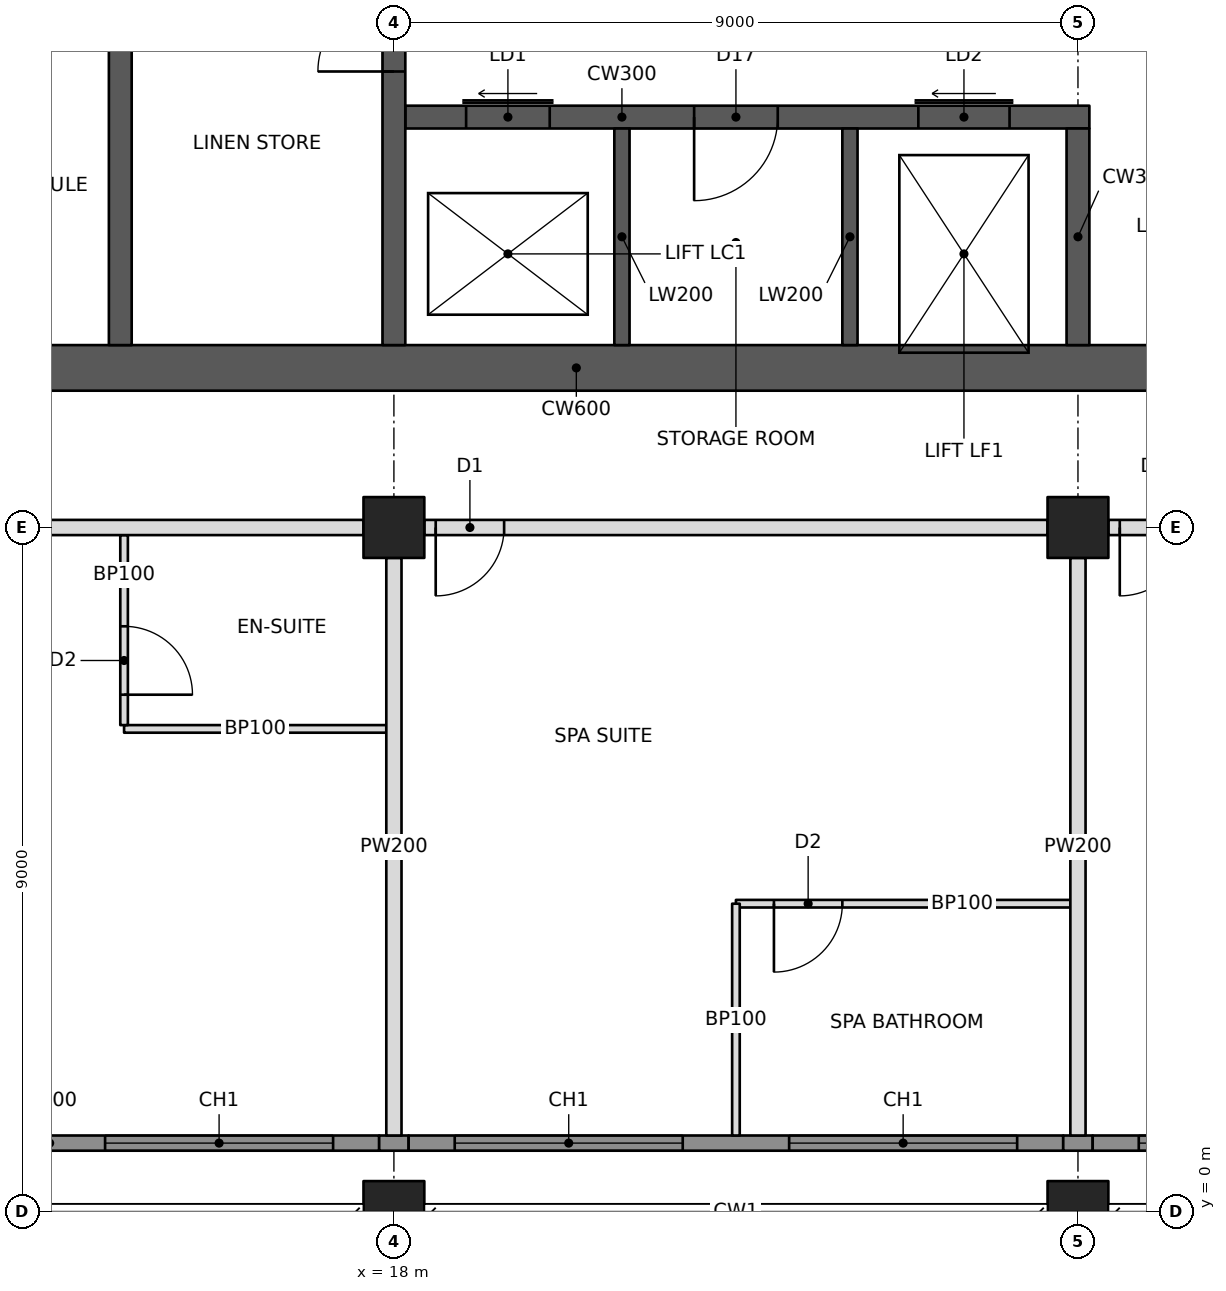
"""IFC4 building model, lengths in metres.
Left out: names, types, materials, properties, quantities, classifications, styles, units other than length and angle.
Written with IfcOpenShell. Run it as: python <this file> out.ifc"""

import sys

from ifc_helpers import new_model, si_unit, direction, frame, frame_2d, origin, origin_2d, place, context, subcontext, project, spatial, rectangle, hollow_rectangle, extrude, element, fill, save


model = new_model("IFC4")
c1 = context("Model", 3, precision=1e-05, world=origin(), true_north=direction((0.0, 1.0)))
c2 = subcontext(c1, "Body", "Model", "MODEL_VIEW")
j1 = project(units=[si_unit("LENGTHUNIT", "METRE"), si_unit("PLANEANGLEUNIT", "RADIAN")], contexts=[c1])
p1 = place(None, origin())
s1 = spatial("IfcSite", under=j1, at=p1, CompositionType="ELEMENT")
p2 = place(p1, origin())
s2 = spatial("IfcBuilding", under=s1, at=p2, CompositionType="ELEMENT")
p3 = place(p2, frame((0.0, 0.0, 174.0)))
s3 = spatial("IfcBuildingStorey", under=s2, at=p3, CompositionType="ELEMENT", Elevation=174.0)
p4 = place(p3, frame((18.0, 0.0, 0.0), z_axis=(0.0, 0.0, 1.0), x_axis=(1.0, 0.0, 0.0)))
e1 = element("IfcColumn", 1, at=p4, inside=s3, PredefinedType="COLUMN", context=c2, shape_type="SweptSolid", body=[
    extrude(hollow_rectangle(XDim=0.8, YDim=0.8, WallThickness=0.07, at=origin_2d()), origin(), (0.0, 0.0, 1.0), 3.4),
])
p5 = place(p3, frame((18.0, 9.0, 0.0), z_axis=(0.0, 0.0, 1.0), x_axis=(1.0, 0.0, 0.0)))
e2 = element("IfcColumn", 2, at=p5, inside=s3, PredefinedType="COLUMN", context=c2, shape_type="SweptSolid", body=[
    extrude(hollow_rectangle(XDim=0.8, YDim=0.8, WallThickness=0.06, at=origin_2d()), origin(), (0.0, 0.0, 1.0), 3.4),
])
p6 = place(p3, frame((27.0, 0.0, 0.0), z_axis=(0.0, 0.0, 1.0), x_axis=(1.0, 0.0, 0.0)))
e3 = element("IfcColumn", 3, at=p6, inside=s3, PredefinedType="COLUMN", context=c2, shape_type="SweptSolid", body=[
    extrude(hollow_rectangle(XDim=0.8, YDim=0.8, WallThickness=0.07, at=origin_2d()), origin(), (0.0, 0.0, 1.0), 3.4),
])
p7 = place(p3, frame((27.0, 9.0, 0.0), z_axis=(0.0, 0.0, 1.0), x_axis=(1.0, 0.0, 0.0)))
e4 = element("IfcColumn", 4, at=p7, inside=s3, PredefinedType="COLUMN", context=c2, shape_type="SweptSolid", body=[
    extrude(hollow_rectangle(XDim=0.8, YDim=0.8, WallThickness=0.06, at=origin_2d()), origin(), (0.0, 0.0, 1.0), 3.4),
])
p8 = place(p3, frame((10.8, 11.1, 0.0), z_axis=(0.0, 0.0, 1.0), x_axis=(1.0, 0.0, 0.0)))
e5 = element("IfcWall", 5, at=p8, inside=s3, PredefinedType="SHEAR", context=c2, shape_type="SweptSolid", body=[
    extrude(rectangle(XDim=23.4, YDim=0.6, at=frame_2d((11.7, 0.0))), origin(), (0.0, 0.0, 1.0), 3.4),
])
p9 = place(p8, frame((1.0, 0.0, 0.0)))
e6 = element("IfcOpeningElement", 6, at=p9, cuts=e5, PredefinedType="OPENING", context=c2, shape_type="SweptSolid", body=[
    extrude(rectangle(XDim=1.0, YDim=2.1, at=frame_2d((0.5, 1.05))), frame((0.0, 0.31, 0.0), z_axis=(0.0, -1.0, 0.0), x_axis=(1.0, 0.0, 0.0)), (0.0, 0.0, 1.0), 0.62),
])
p10 = place(p8, frame((17.2, 0.0, 0.0)))
e7 = element("IfcOpeningElement", 7, at=p10, cuts=e5, PredefinedType="OPENING", context=c2, shape_type="SweptSolid", body=[
    extrude(rectangle(XDim=1.8, YDim=2.1, at=frame_2d((0.9, 1.05))), frame((0.0, 0.31, 0.0), z_axis=(0.0, -1.0, 0.0), x_axis=(1.0, 0.0, 0.0)), (0.0, 0.0, 1.0), 0.62),
])
p11 = place(p3, frame((14.4, 11.4, 0.0), z_axis=(0.0, 0.0, 1.0), x_axis=(0.0, 1.0, 0.0)))
e8 = element("IfcWall", 8, at=p11, inside=s3, PredefinedType="SHEAR", context=c2, shape_type="SweptSolid", body=[
    extrude(rectangle(XDim=13.2, YDim=0.3, at=frame_2d((6.6, 0.0))), origin(), (0.0, 0.0, 1.0), 3.4),
])
p12 = place(p3, frame((18.0, 11.4, 0.0), z_axis=(0.0, 0.0, 1.0), x_axis=(0.0, 1.0, 0.0)))
e9 = element("IfcWall", 9, at=p12, inside=s3, PredefinedType="SHEAR", context=c2, shape_type="SweptSolid", body=[
    extrude(rectangle(XDim=13.2, YDim=0.3, at=frame_2d((6.6, 0.0))), origin(), (0.0, 0.0, 1.0), 3.4),
])
p13 = place(p12, frame((3.6, 0.0, 0.0)))
e10 = element("IfcOpeningElement", 10, at=p13, cuts=e9, PredefinedType="OPENING", context=c2, shape_type="SweptSolid", body=[
    extrude(rectangle(XDim=1.0, YDim=2.1, at=frame_2d((0.5, 1.05))), frame((0.0, 0.16, 0.0), z_axis=(0.0, -1.0, 0.0), x_axis=(1.0, 0.0, 0.0)), (0.0, 0.0, 1.0), 0.32),
])
p14 = place(p12, frame((7.85, 0.0, 0.0)))
e11 = element("IfcOpeningElement", 11, at=p14, cuts=e9, PredefinedType="OPENING", context=c2, shape_type="SweptSolid", body=[
    extrude(rectangle(XDim=1.1, YDim=2.1, at=frame_2d((0.55, 1.05))), frame((0.0, 0.16, 0.0), z_axis=(0.0, -1.0, 0.0), x_axis=(1.0, 0.0, 0.0)), (0.0, 0.0, 1.0), 0.32),
])
p15 = place(p3, frame((18.15, 14.4, 0.0), z_axis=(0.0, 0.0, 1.0), x_axis=(1.0, 0.0, 0.0)))
e12 = element("IfcWall", 12, at=p15, inside=s3, PredefinedType="SHEAR", context=c2, shape_type="SweptSolid", body=[
    extrude(rectangle(XDim=9.0, YDim=0.3, at=frame_2d((4.5, 0.0))), origin(), (0.0, 0.0, 1.0), 3.4),
])
p16 = place(p15, frame((0.8, 0.0, 0.0)))
e13 = element("IfcOpeningElement", 13, at=p16, cuts=e12, PredefinedType="OPENING", context=c2, shape_type="SweptSolid", body=[
    extrude(rectangle(XDim=1.1, YDim=2.1, at=frame_2d((0.55, 1.05))), frame((0.0, 0.16, 0.0), z_axis=(0.0, -1.0, 0.0), x_axis=(1.0, 0.0, 0.0)), (0.0, 0.0, 1.0), 0.32),
])
p17 = place(p15, frame((6.75, 0.0, 0.0)))
e14 = element("IfcOpeningElement", 14, at=p17, cuts=e12, PredefinedType="OPENING", context=c2, shape_type="SweptSolid", body=[
    extrude(rectangle(XDim=1.2, YDim=2.1, at=frame_2d((0.6, 1.05))), frame((0.0, 0.16, 0.0), z_axis=(0.0, -1.0, 0.0), x_axis=(1.0, 0.0, 0.0)), (0.0, 0.0, 1.0), 0.32),
])
p18 = place(p15, frame((3.8, 0.0, 0.0)))
e15 = element("IfcOpeningElement", 15, at=p18, cuts=e12, PredefinedType="OPENING", context=c2, shape_type="SweptSolid", body=[
    extrude(rectangle(XDim=1.1, YDim=2.1, at=frame_2d((0.55, 1.05))), frame((0.0, 0.16, 0.0), z_axis=(0.0, -1.0, 0.0), x_axis=(1.0, 0.0, 0.0)), (0.0, 0.0, 1.0), 0.32),
])
p19 = place(p3, frame((27.0, 11.4, 0.0), z_axis=(0.0, 0.0, 1.0), x_axis=(0.0, 1.0, 0.0)))
e16 = element("IfcWall", 16, at=p19, inside=s3, PredefinedType="SHEAR", context=c2, shape_type="SweptSolid", body=[
    extrude(rectangle(XDim=2.85, YDim=0.3, at=frame_2d((1.425, 0.0))), origin(), (0.0, 0.0, 1.0), 3.4),
])
for number, where, z_axis, x_axis in (
    (17, (21.0, 11.4, 0.0), (0.0, 0.0, 1.0), (0.0, 1.0, 0.0)),
    (18, (24.0, 11.4, 0.0), (0.0, 0.0, 1.0), (0.0, 1.0, 0.0)),
):
    element("IfcWall", number, at=place(p3, frame(where, z_axis=z_axis, x_axis=x_axis)), inside=s3, PredefinedType="SHEAR", context=c2, shape_type="SweptSolid", body=[
        extrude(rectangle(XDim=2.85, YDim=0.2, at=frame_2d((1.425, 0.0))), origin(), (0.0, 0.0, 1.0), 3.4),
    ])
p20 = place(p3, frame((9.4, 9.0, 0.0), z_axis=(0.0, 0.0, 1.0), x_axis=(1.0, 0.0, 0.0)))
e19 = element("IfcWall", 19, at=p20, inside=s3, PredefinedType="PARTITIONING", context=c2, shape_type="SweptSolid", body=[
    extrude(rectangle(XDim=8.2, YDim=0.2, at=frame_2d((4.1, 0.0))), origin(), (0.0, 0.0, 1.0), 2.405),
])
p21 = place(p20, frame((0.15, 0.0, 0.0)))
e20 = element("IfcOpeningElement", 20, at=p21, cuts=e19, PredefinedType="OPENING", context=c2, shape_type="SweptSolid", body=[
    extrude(rectangle(XDim=0.9, YDim=2.1, at=frame_2d((0.45, 1.05))), frame((0.0, 0.11, 0.0), z_axis=(0.0, -1.0, 0.0), x_axis=(1.0, 0.0, 0.0)), (0.0, 0.0, 1.0), 0.22),
])
p22 = place(p3, frame((18.4, 9.0, 0.0), z_axis=(0.0, 0.0, 1.0), x_axis=(1.0, 0.0, 0.0)))
e21 = element("IfcWall", 21, at=p22, inside=s3, PredefinedType="PARTITIONING", context=c2, shape_type="SweptSolid", body=[
    extrude(rectangle(XDim=8.2, YDim=0.2, at=frame_2d((4.1, 0.0))), origin(), (0.0, 0.0, 1.0), 2.405),
])
p23 = place(p22, frame((0.15, 0.0, 0.0)))
e22 = element("IfcOpeningElement", 22, at=p23, cuts=e21, PredefinedType="OPENING", context=c2, shape_type="SweptSolid", body=[
    extrude(rectangle(XDim=0.9, YDim=2.1, at=frame_2d((0.45, 1.05))), frame((0.0, 0.11, 0.0), z_axis=(0.0, -1.0, 0.0), x_axis=(1.0, 0.0, 0.0)), (0.0, 0.0, 1.0), 0.22),
])
p24 = place(p3, frame((27.4, 9.0, 0.0), z_axis=(0.0, 0.0, 1.0), x_axis=(1.0, 0.0, 0.0)))
e23 = element("IfcWall", 23, at=p24, inside=s3, PredefinedType="PARTITIONING", context=c2, shape_type="SweptSolid", body=[
    extrude(rectangle(XDim=8.2, YDim=0.2, at=frame_2d((4.1, 0.0))), origin(), (0.0, 0.0, 1.0), 2.405),
])
p25 = place(p24, frame((0.15, 0.0, 0.0)))
e24 = element("IfcOpeningElement", 24, at=p25, cuts=e23, PredefinedType="OPENING", context=c2, shape_type="SweptSolid", body=[
    extrude(rectangle(XDim=0.9, YDim=2.1, at=frame_2d((0.45, 1.05))), frame((0.0, 0.11, 0.0), z_axis=(0.0, -1.0, 0.0), x_axis=(1.0, 0.0, 0.0)), (0.0, 0.0, 1.0), 0.22),
])
for number, where, z_axis, x_axis in (
    (25, (18.0, 8.6, 0.0), (0.0, 0.0, 1.0), (0.0, -1.0, 0.0)),
    (26, (27.0, 8.6, 0.0), (0.0, 0.0, 1.0), (0.0, -1.0, 0.0)),
):
    element("IfcWall", number, at=place(p3, frame(where, z_axis=z_axis, x_axis=x_axis)), inside=s3, PredefinedType="PARTITIONING", context=c2, shape_type="SweptSolid", body=[
        extrude(rectangle(XDim=7.6, YDim=0.2, at=frame_2d((3.8, 0.0))), origin(), (0.0, 0.0, 1.0), 2.405),
    ])
p26 = place(p3, frame((14.45, 6.35, 0.0), z_axis=(0.0, 0.0, 1.0), x_axis=(1.0, 0.0, 0.0)))
e27 = element("IfcWall", 27, at=p26, inside=s3, PredefinedType="PARTITIONING", context=c2, shape_type="SweptSolid", body=[
    extrude(rectangle(XDim=3.45, YDim=0.1, at=frame_2d((1.725, 0.0))), origin(), (0.0, 0.0, 1.0), 2.404),
])
p27 = place(p3, frame((14.45, 8.9, 0.0), z_axis=(0.0, 0.0, 1.0), x_axis=(0.0, -1.0, 0.0)))
e28 = element("IfcWall", 28, at=p27, inside=s3, PredefinedType="PARTITIONING", context=c2, shape_type="SweptSolid", body=[
    extrude(rectangle(XDim=2.5, YDim=0.1, at=frame_2d((1.25, 0.0))), origin(), (0.0, 0.0, 1.0), 2.404),
])
p28 = place(p27, frame((1.2, 0.0, 0.0)))
e29 = element("IfcOpeningElement", 29, at=p28, cuts=e28, PredefinedType="OPENING", context=c2, shape_type="SweptSolid", body=[
    extrude(rectangle(XDim=0.9, YDim=2.1, at=frame_2d((0.45, 1.05))), frame((0.0, 0.06, 0.0), z_axis=(0.0, -1.0, 0.0), x_axis=(1.0, 0.0, 0.0)), (0.0, 0.0, 1.0), 0.12),
])
p29 = place(p3, frame((22.5, 4.05, 0.0), z_axis=(0.0, 0.0, 1.0), x_axis=(1.0, 0.0, 0.0)))
e30 = element("IfcWall", 30, at=p29, inside=s3, PredefinedType="PARTITIONING", context=c2, shape_type="SweptSolid", body=[
    extrude(rectangle(XDim=4.4, YDim=0.1, at=frame_2d((2.2, 0.0))), origin(), (0.0, 0.0, 1.0), 2.404),
])
p30 = place(p29, frame((0.5, 0.0, 0.0)))
e31 = element("IfcOpeningElement", 31, at=p30, cuts=e30, PredefinedType="OPENING", context=c2, shape_type="SweptSolid", body=[
    extrude(rectangle(XDim=0.9, YDim=2.1, at=frame_2d((0.45, 1.05))), frame((0.0, 0.06, 0.0), z_axis=(0.0, -1.0, 0.0), x_axis=(1.0, 0.0, 0.0)), (0.0, 0.0, 1.0), 0.12),
])
p31 = place(p3, frame((22.5, 4.05, 0.0), z_axis=(0.0, 0.0, 1.0), x_axis=(0.0, -1.0, 0.0)))
e32 = element("IfcWall", 32, at=p31, inside=s3, PredefinedType="PARTITIONING", context=c2, shape_type="SweptSolid", body=[
    extrude(rectangle(XDim=3.05, YDim=0.1, at=frame_2d((1.525, 0.0))), origin(), (0.0, 0.0, 1.0), 3.2),
])
p32 = place(p3, frame((9.135, 0.9, 0.0), z_axis=(0.0, 0.0, 1.0), x_axis=(1.0, 0.0, 0.0)))
e33 = element("IfcWall", 33, at=p32, inside=s3, PredefinedType="SOLIDWALL", context=c2, shape_type="SweptSolid", body=[
    extrude(rectangle(XDim=8.671, YDim=0.2, at=frame_2d((4.335, 0.0))), origin(), (0.0, 0.0, 1.0), 3.2),
])
p33 = place(p32, frame((0.665, 0.0, 0.6)))
e34 = element("IfcOpeningElement", 34, at=p33, cuts=e33, PredefinedType="OPENING", context=c2, shape_type="SweptSolid", body=[
    extrude(rectangle(XDim=3.0, YDim=2.2, at=frame_2d((1.5, 1.1))), frame((0.0, 0.11, 0.0), z_axis=(0.0, -1.0, 0.0), x_axis=(1.0, 0.0, 0.0)), (0.0, 0.0, 1.0), 0.22),
])
p34 = place(p32, frame((5.065, 0.0, 0.6)))
e35 = element("IfcOpeningElement", 35, at=p34, cuts=e33, PredefinedType="OPENING", context=c2, shape_type="SweptSolid", body=[
    extrude(rectangle(XDim=3.0, YDim=2.2, at=frame_2d((1.5, 1.1))), frame((0.0, 0.11, 0.0), z_axis=(0.0, -1.0, 0.0), x_axis=(1.0, 0.0, 0.0)), (0.0, 0.0, 1.0), 0.22),
])
p35 = place(p3, frame((17.806, 0.9, 0.0), z_axis=(0.0, 0.0, 1.0), x_axis=(1.0, 0.0, 0.0)))
e36 = element("IfcWall", 36, at=p35, inside=s3, PredefinedType="SOLIDWALL", context=c2, shape_type="SweptSolid", body=[
    extrude(rectangle(XDim=0.388, YDim=0.2, at=frame_2d((0.194, 0.0))), origin(), (0.0, 0.0, 1.0), 2.404),
])
p36 = place(p3, frame((18.194, 0.9, 0.0), z_axis=(0.0, 0.0, 1.0), x_axis=(1.0, 0.0, 0.0)))
e37 = element("IfcWall", 37, at=p36, inside=s3, PredefinedType="SOLIDWALL", context=c2, shape_type="SweptSolid", body=[
    extrude(rectangle(XDim=8.612, YDim=0.2, at=frame_2d((4.306, 0.0))), origin(), (0.0, 0.0, 1.0), 3.2),
])
p37 = place(p36, frame((0.606, 0.0, 0.6)))
e38 = element("IfcOpeningElement", 38, at=p37, cuts=e37, PredefinedType="OPENING", context=c2, shape_type="SweptSolid", body=[
    extrude(rectangle(XDim=3.0, YDim=2.2, at=frame_2d((1.5, 1.1))), frame((0.0, 0.11, 0.0), z_axis=(0.0, -1.0, 0.0), x_axis=(1.0, 0.0, 0.0)), (0.0, 0.0, 1.0), 0.22),
])
p38 = place(p36, frame((5.006, 0.0, 0.6)))
e39 = element("IfcOpeningElement", 39, at=p38, cuts=e37, PredefinedType="OPENING", context=c2, shape_type="SweptSolid", body=[
    extrude(rectangle(XDim=3.0, YDim=2.2, at=frame_2d((1.5, 1.1))), frame((0.0, 0.11, 0.0), z_axis=(0.0, -1.0, 0.0), x_axis=(1.0, 0.0, 0.0)), (0.0, 0.0, 1.0), 0.22),
])
p39 = place(p3, frame((26.806, 0.9, 0.0), z_axis=(0.0, 0.0, 1.0), x_axis=(1.0, 0.0, 0.0)))
e40 = element("IfcWall", 40, at=p39, inside=s3, PredefinedType="SOLIDWALL", context=c2, shape_type="SweptSolid", body=[
    extrude(rectangle(XDim=0.388, YDim=0.2, at=frame_2d((0.194, 0.0))), origin(), (0.0, 0.0, 1.0), 2.404),
])
p40 = place(p3, frame((27.194, 0.9, 0.0), z_axis=(0.0, 0.0, 1.0), x_axis=(1.0, 0.0, 0.0)))
e41 = element("IfcWall", 41, at=p40, inside=s3, PredefinedType="SOLIDWALL", context=c2, shape_type="SweptSolid", body=[
    extrude(rectangle(XDim=8.671, YDim=0.2, at=frame_2d((4.335, 0.0))), origin(), (0.0, 0.0, 1.0), 3.2),
])
p41 = place(p40, frame((0.606, 0.0, 0.6)))
e42 = element("IfcOpeningElement", 42, at=p41, cuts=e41, PredefinedType="OPENING", context=c2, shape_type="SweptSolid", body=[
    extrude(rectangle(XDim=3.0, YDim=2.2, at=frame_2d((1.5, 1.1))), frame((0.0, 0.11, 0.0), z_axis=(0.0, -1.0, 0.0), x_axis=(1.0, 0.0, 0.0)), (0.0, 0.0, 1.0), 0.22),
])
p42 = place(p40, frame((5.006, 0.0, 0.6)))
e43 = element("IfcOpeningElement", 43, at=p42, cuts=e41, PredefinedType="OPENING", context=c2, shape_type="SweptSolid", body=[
    extrude(rectangle(XDim=3.0, YDim=2.2, at=frame_2d((1.5, 1.1))), frame((0.0, 0.11, 0.0), z_axis=(0.0, -1.0, 0.0), x_axis=(1.0, 0.0, 0.0)), (0.0, 0.0, 1.0), 0.22),
])
p43 = place(p34, origin())
e44 = element("IfcWindow", 44, at=p43, inside=s3, PartitioningType="TRIPLE_PANEL_VERTICAL", PredefinedType="WINDOW", context=c2, shape_type="SweptSolid", body=[
    extrude(rectangle(XDim=3.0, YDim=2.2, at=frame_2d((1.5, 1.1))), frame((0.0, 0.03, 0.0), z_axis=(0.0, -1.0, 0.0), x_axis=(1.0, 0.0, 0.0)), (0.0, 0.0, 1.0), 0.06),
])
fill(e35, e44)
p44 = place(p37, origin())
e45 = element("IfcWindow", 45, at=p44, inside=s3, PartitioningType="TRIPLE_PANEL_VERTICAL", PredefinedType="WINDOW", context=c2, shape_type="SweptSolid", body=[
    extrude(rectangle(XDim=3.0, YDim=2.2, at=frame_2d((1.5, 1.1))), frame((0.0, 0.03, 0.0), z_axis=(0.0, -1.0, 0.0), x_axis=(1.0, 0.0, 0.0)), (0.0, 0.0, 1.0), 0.06),
])
fill(e38, e45)
p45 = place(p38, origin())
e46 = element("IfcWindow", 46, at=p45, inside=s3, PartitioningType="TRIPLE_PANEL_VERTICAL", PredefinedType="WINDOW", context=c2, shape_type="SweptSolid", body=[
    extrude(rectangle(XDim=3.0, YDim=2.2, at=frame_2d((1.5, 1.1))), frame((0.0, 0.03, 0.0), z_axis=(0.0, -1.0, 0.0), x_axis=(1.0, 0.0, 0.0)), (0.0, 0.0, 1.0), 0.06),
])
fill(e39, e46)
p46 = place(p41, origin())
e47 = element("IfcWindow", 47, at=p46, inside=s3, PartitioningType="TRIPLE_PANEL_VERTICAL", PredefinedType="WINDOW", context=c2, shape_type="SweptSolid", body=[
    extrude(rectangle(XDim=3.0, YDim=2.2, at=frame_2d((1.5, 1.1))), frame((0.0, 0.03, 0.0), z_axis=(0.0, -1.0, 0.0), x_axis=(1.0, 0.0, 0.0)), (0.0, 0.0, 1.0), 0.06),
])
fill(e42, e47)
p47 = place(p28, origin())
e48 = element("IfcDoor", 48, at=p47, inside=s3, OperationType="SINGLE_SWING_RIGHT", PredefinedType="DOOR", context=c2, shape_type="SweptSolid", body=[
    extrude(rectangle(XDim=0.9, YDim=2.1, at=frame_2d((0.45, 1.05))), frame((0.0, 0.025, 0.0), z_axis=(0.0, -1.0, 0.0), x_axis=(1.0, 0.0, 0.0)), (0.0, 0.0, 1.0), 0.05),
])
fill(e29, e48)
p48 = place(p30, frame((0.9, 0.0, 0.0), z_axis=(0.0, 0.0, 1.0), x_axis=(-1.0, 0.0, 0.0)))
e49 = element("IfcDoor", 49, at=p48, inside=s3, OperationType="SINGLE_SWING_RIGHT", PredefinedType="DOOR", context=c2, shape_type="SweptSolid", body=[
    extrude(rectangle(XDim=0.9, YDim=2.1, at=frame_2d((0.45, 1.05))), frame((0.0, 0.025, 0.0), z_axis=(0.0, -1.0, 0.0), x_axis=(1.0, 0.0, 0.0)), (0.0, 0.0, 1.0), 0.05),
])
fill(e31, e49)
p49 = place(p23, frame((0.9, 0.0, 0.0), z_axis=(0.0, 0.0, 1.0), x_axis=(-1.0, 0.0, 0.0)))
e50 = element("IfcDoor", 50, at=p49, inside=s3, OperationType="SINGLE_SWING_RIGHT", PredefinedType="DOOR", context=c2, shape_type="SweptSolid", body=[
    extrude(rectangle(XDim=0.9, YDim=2.1, at=frame_2d((0.45, 1.05))), frame((0.0, 0.025, 0.0), z_axis=(0.0, -1.0, 0.0), x_axis=(1.0, 0.0, 0.0)), (0.0, 0.0, 1.0), 0.05),
])
fill(e22, e50)
p50 = place(p25, frame((0.9, 0.0, 0.0), z_axis=(0.0, 0.0, 1.0), x_axis=(-1.0, 0.0, 0.0)))
e51 = element("IfcDoor", 51, at=p50, inside=s3, OperationType="SINGLE_SWING_RIGHT", PredefinedType="DOOR", context=c2, shape_type="SweptSolid", body=[
    extrude(rectangle(XDim=0.9, YDim=2.1, at=frame_2d((0.45, 1.05))), frame((0.0, 0.025, 0.0), z_axis=(0.0, -1.0, 0.0), x_axis=(1.0, 0.0, 0.0)), (0.0, 0.0, 1.0), 0.05),
])
fill(e24, e51)
p51 = place(p13, origin())
e52 = element("IfcDoor", 52, at=p51, inside=s3, OperationType="SINGLE_SWING_LEFT", PredefinedType="DOOR", context=c2, shape_type="SweptSolid", body=[
    extrude(rectangle(XDim=1.0, YDim=2.1, at=frame_2d((0.5, 1.05))), frame((0.0, 0.025, 0.0), z_axis=(0.0, -1.0, 0.0), x_axis=(1.0, 0.0, 0.0)), (0.0, 0.0, 1.0), 0.05),
])
fill(e10, e52)
p52 = place(p16, origin())
e53 = element("IfcDoor", 53, at=p52, inside=s3, OperationType="SLIDING_TO_LEFT", PredefinedType="DOOR", context=c2, shape_type="SweptSolid", body=[
    extrude(rectangle(XDim=1.1, YDim=2.1, at=frame_2d((0.55, 1.05))), frame((0.0, 0.025, 0.0), z_axis=(0.0, -1.0, 0.0), x_axis=(1.0, 0.0, 0.0)), (0.0, 0.0, 1.0), 0.05),
])
fill(e13, e53)
p53 = place(p17, origin())
e54 = element("IfcDoor", 54, at=p53, inside=s3, OperationType="SLIDING_TO_LEFT", PredefinedType="DOOR", context=c2, shape_type="SweptSolid", body=[
    extrude(rectangle(XDim=1.2, YDim=2.1, at=frame_2d((0.6, 1.05))), frame((0.0, 0.025, 0.0), z_axis=(0.0, -1.0, 0.0), x_axis=(1.0, 0.0, 0.0)), (0.0, 0.0, 1.0), 0.05),
])
fill(e14, e54)
p54 = place(p18, frame((1.1, 0.0, 0.0), z_axis=(0.0, 0.0, 1.0), x_axis=(-1.0, 0.0, 0.0)))
e55 = element("IfcDoor", 55, at=p54, inside=s3, OperationType="SINGLE_SWING_RIGHT", PredefinedType="DOOR", context=c2, shape_type="SweptSolid", body=[
    extrude(rectangle(XDim=1.1, YDim=2.1, at=frame_2d((0.55, 1.05))), frame((0.0, 0.025, 0.0), z_axis=(0.0, -1.0, 0.0), x_axis=(1.0, 0.0, 0.0)), (0.0, 0.0, 1.0), 0.05),
])
fill(e15, e55)
save(model, sys.argv[1])
